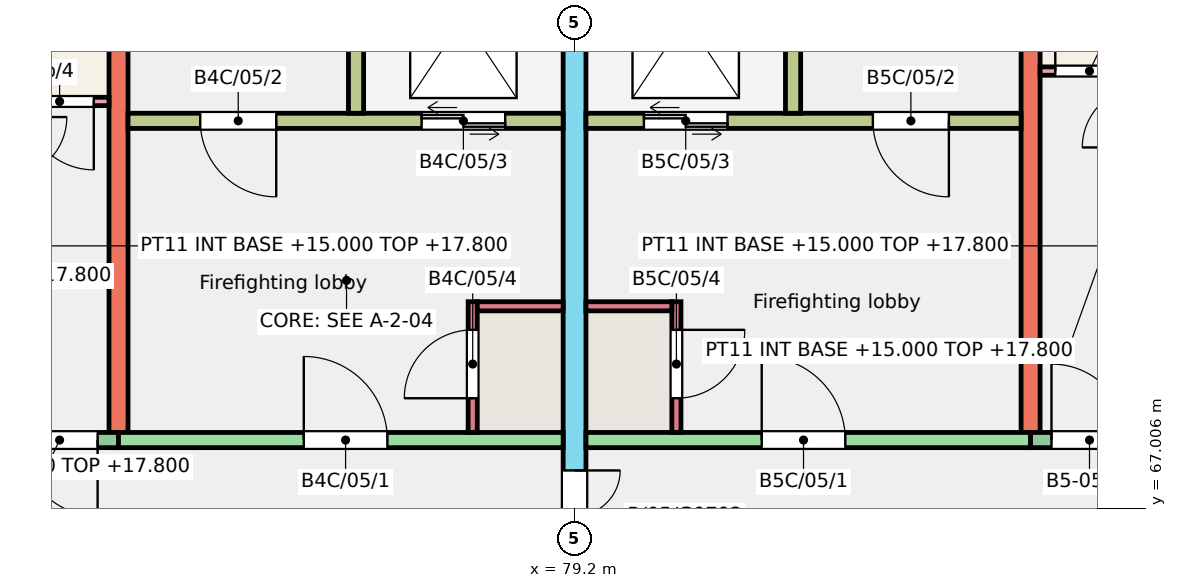
"""IFC4 building model, lengths in metres.
Left out: names, types, materials, properties, quantities, classifications, styles, units other than length and angle.
Written with IfcOpenShell. Run it as: python <this file> out.ifc"""

import sys

from ifc_helpers import new_model, si_unit, direction, frame, frame_2d, origin, place, context, subcontext, project, spatial, rectangle, extrude, element, fill, save


model = new_model("IFC4")
c1 = context("Model", 3, precision=1e-05, world=origin(), true_north=direction((0.0, 1.0)))
c2 = subcontext(c1, "Body", "Model", "MODEL_VIEW")
j1 = project(units=[si_unit("LENGTHUNIT", "METRE"), si_unit("PLANEANGLEUNIT", "RADIAN")], contexts=[c1])
p1 = place(None, origin())
s1 = spatial("IfcSite", under=j1, at=p1, CompositionType="ELEMENT")
p2 = place(p1, origin())
s2 = spatial("IfcBuilding", under=s1, at=p2, CompositionType="ELEMENT")
p3 = place(p2, frame((0.0, 0.0, 15.0)))
s3 = spatial("IfcBuildingStorey", under=s2, at=p3, CompositionType="ELEMENT", Elevation=15.0)
p4 = place(p3, frame((73.2, 68.0, 0.0), z_axis=(0.0, 0.0, 1.0), x_axis=(0.0, 1.0, 0.0)))
e1 = element("IfcWall", 1, at=p4, inside=s3, PredefinedType="SHEAR", context=c2, shape_type="SweptSolid", body=[
    extrude(rectangle(XDim=9.0, YDim=0.25, at=frame_2d((4.5, 0.0))), origin(), (0.0, 0.0, 1.0), 3.0),
])
p5 = place(p3, frame((79.2, 66.0, 0.0), z_axis=(0.0, 0.0, 1.0), x_axis=(0.0, 1.0, 0.0)))
e2 = element("IfcWall", 2, at=p5, inside=s3, PredefinedType="SHEAR", context=c2, shape_type="SweptSolid", body=[
    extrude(rectangle(XDim=11.0, YDim=0.3, at=frame_2d((5.5, 0.0))), origin(), (0.0, 0.0, 1.0), 3.0),
])
p6 = place(p5, frame((0.3, 0.0, 0.0)))
e3 = element("IfcOpeningElement", 3, at=p6, cuts=e2, PredefinedType="OPENING", context=c2, shape_type="SweptSolid", body=[
    extrude(rectangle(XDim=1.2, YDim=2.1, at=frame_2d((0.6, 1.05))), frame((0.0, 0.16, 0.0), z_axis=(0.0, -1.0, 0.0), x_axis=(1.0, 0.0, 0.0)), (0.0, 0.0, 1.0), 0.32),
])
p7 = place(p3, frame((85.2, 68.0, 0.0), z_axis=(0.0, 0.0, 1.0), x_axis=(0.0, 1.0, 0.0)))
e4 = element("IfcWall", 4, at=p7, inside=s3, PredefinedType="SHEAR", context=c2, shape_type="SweptSolid", body=[
    extrude(rectangle(XDim=9.0, YDim=0.25, at=frame_2d((4.5, 0.0))), origin(), (0.0, 0.0, 1.0), 3.0),
])
p8 = place(p3, frame((69.6, 67.9, 0.0), z_axis=(0.0, 0.0, 1.0), x_axis=(1.0, 0.0, 0.0)))
e5 = element("IfcWall", 5, at=p8, inside=s3, PredefinedType="SOLIDWALL", context=c2, shape_type="SweptSolid", body=[
    extrude(rectangle(XDim=3.6, YDim=0.2, at=frame_2d((1.8, 0.0))), origin(), (0.0, 0.0, 1.0), 3.0),
])
p9 = place(p8, frame((0.482, 0.0, 1.1)))
e6 = element("IfcOpeningElement", 6, at=p9, cuts=e5, PredefinedType="OPENING", context=c2, shape_type="SweptSolid", body=[
    extrude(rectangle(XDim=1.2, YDim=1.3, at=frame_2d((0.6, 0.65))), frame((0.0, 0.11, 0.0), z_axis=(0.0, -1.0, 0.0), x_axis=(1.0, 0.0, 0.0)), (0.0, 0.0, 1.0), 0.22),
])
p10 = place(p8, frame((2.325, 0.0, 0.0)))
e7 = element("IfcOpeningElement", 7, at=p10, cuts=e5, PredefinedType="OPENING", context=c2, shape_type="SweptSolid", body=[
    extrude(rectangle(XDim=1.0, YDim=2.1, at=frame_2d((0.5, 1.05))), frame((0.0, 0.11, 0.0), z_axis=(0.0, -1.0, 0.0), x_axis=(1.0, 0.0, 0.0)), (0.0, 0.0, 1.0), 0.22),
])
p11 = place(p3, frame((73.2, 67.9, 0.0), z_axis=(0.0, 0.0, 1.0), x_axis=(1.0, 0.0, 0.0)))
e8 = element("IfcWall", 8, at=p11, inside=s3, PredefinedType="SHEAR", context=c2, shape_type="SweptSolid", body=[
    extrude(rectangle(XDim=5.85, YDim=0.2, at=frame_2d((2.925, 0.0))), origin(), (0.0, 0.0, 1.0), 3.0),
])
p12 = place(p11, frame((2.438, 0.0, 0.0)))
e9 = element("IfcOpeningElement", 9, at=p12, cuts=e8, PredefinedType="OPENING", context=c2, shape_type="SweptSolid", body=[
    extrude(rectangle(XDim=1.1, YDim=2.1, at=frame_2d((0.55, 1.05))), frame((0.0, 0.11, 0.0), z_axis=(0.0, -1.0, 0.0), x_axis=(1.0, 0.0, 0.0)), (0.0, 0.0, 1.0), 0.22),
])
p13 = place(p3, frame((73.325, 72.1, 0.0), z_axis=(0.0, 0.0, 1.0), x_axis=(1.0, 0.0, 0.0)))
e10 = element("IfcWall", 10, at=p13, inside=s3, PredefinedType="SHEAR", context=c2, shape_type="SweptSolid", body=[
    extrude(rectangle(XDim=5.725, YDim=0.2, at=frame_2d((2.863, 0.0))), origin(), (0.0, 0.0, 1.0), 3.0),
])
p14 = place(p13, frame((0.95, 0.0, 0.0)))
e11 = element("IfcOpeningElement", 11, at=p14, cuts=e10, PredefinedType="OPENING", context=c2, shape_type="SweptSolid", body=[
    extrude(rectangle(XDim=1.0, YDim=2.1, at=frame_2d((0.5, 1.05))), frame((0.0, 0.11, 0.0), z_axis=(0.0, -1.0, 0.0), x_axis=(1.0, 0.0, 0.0)), (0.0, 0.0, 1.0), 0.22),
])
p15 = place(p13, frame((3.863, 0.0, 0.0)))
e12 = element("IfcOpeningElement", 12, at=p15, cuts=e10, PredefinedType="OPENING", context=c2, shape_type="SweptSolid", body=[
    extrude(rectangle(XDim=1.1, YDim=2.1, at=frame_2d((0.55, 1.05))), frame((0.0, 0.11, 0.0), z_axis=(0.0, -1.0, 0.0), x_axis=(1.0, 0.0, 0.0)), (0.0, 0.0, 1.0), 0.22),
])
p16 = place(p3, frame((76.325, 72.2, 0.0), z_axis=(0.0, 0.0, 1.0), x_axis=(0.0, 1.0, 0.0)))
e13 = element("IfcWall", 13, at=p16, inside=s3, PredefinedType="SHEAR", context=c2, shape_type="SweptSolid", body=[
    extrude(rectangle(XDim=4.8, YDim=0.2, at=frame_2d((2.4, 0.0))), origin(), (0.0, 0.0, 1.0), 3.0),
])
p17 = place(p3, frame((77.86, 68.0, 0.0), z_axis=(0.0, 0.0, 1.0), x_axis=(0.0, 1.0, 0.0)))
e14 = element("IfcWall", 14, at=p17, inside=s3, PredefinedType="SHEAR", context=c2, shape_type="SweptSolid", body=[
    extrude(rectangle(XDim=1.72, YDim=0.12, at=frame_2d((0.86, 0.0))), origin(), (0.0, 0.0, 1.0), 3.0),
])
p18 = place(p17, frame((0.45, 0.0, 0.0)))
e15 = element("IfcOpeningElement", 15, at=p18, cuts=e14, PredefinedType="OPENING", context=c2, shape_type="SweptSolid", body=[
    extrude(rectangle(XDim=0.9, YDim=2.1, at=frame_2d((0.45, 1.05))), frame((0.0, 0.07, 0.0), z_axis=(0.0, -1.0, 0.0), x_axis=(1.0, 0.0, 0.0)), (0.0, 0.0, 1.0), 0.14),
])
p19 = place(p3, frame((77.92, 69.66, 0.0), z_axis=(0.0, 0.0, 1.0), x_axis=(1.0, 0.0, 0.0)))
e16 = element("IfcWall", 16, at=p19, inside=s3, PredefinedType="SHEAR", context=c2, shape_type="SweptSolid", body=[
    extrude(rectangle(XDim=1.13, YDim=0.12, at=frame_2d((0.565, 0.0))), origin(), (0.0, 0.0, 1.0), 3.0),
])
p20 = place(p3, frame((79.35, 67.9, 0.0), z_axis=(0.0, 0.0, 1.0), x_axis=(1.0, 0.0, 0.0)))
e17 = element("IfcWall", 17, at=p20, inside=s3, PredefinedType="SHEAR", context=c2, shape_type="SweptSolid", body=[
    extrude(rectangle(XDim=5.85, YDim=0.2, at=frame_2d((2.925, 0.0))), origin(), (0.0, 0.0, 1.0), 3.0),
])
p21 = place(p20, frame((2.312, 0.0, 0.0)))
e18 = element("IfcOpeningElement", 18, at=p21, cuts=e17, PredefinedType="OPENING", context=c2, shape_type="SweptSolid", body=[
    extrude(rectangle(XDim=1.1, YDim=2.1, at=frame_2d((0.55, 1.05))), frame((0.0, 0.11, 0.0), z_axis=(0.0, -1.0, 0.0), x_axis=(1.0, 0.0, 0.0)), (0.0, 0.0, 1.0), 0.22),
])
p22 = place(p3, frame((79.35, 72.1, 0.0), z_axis=(0.0, 0.0, 1.0), x_axis=(1.0, 0.0, 0.0)))
e19 = element("IfcWall", 19, at=p22, inside=s3, PredefinedType="SHEAR", context=c2, shape_type="SweptSolid", body=[
    extrude(rectangle(XDim=5.725, YDim=0.2, at=frame_2d((2.862, 0.0))), origin(), (0.0, 0.0, 1.0), 3.0),
])
p23 = place(p22, frame((3.775, 0.0, 0.0)))
e20 = element("IfcOpeningElement", 20, at=p23, cuts=e19, PredefinedType="OPENING", context=c2, shape_type="SweptSolid", body=[
    extrude(rectangle(XDim=1.0, YDim=2.1, at=frame_2d((0.5, 1.05))), frame((0.0, 0.11, 0.0), z_axis=(0.0, -1.0, 0.0), x_axis=(1.0, 0.0, 0.0)), (0.0, 0.0, 1.0), 0.22),
])
p24 = place(p22, frame((0.762, 0.0, 0.0)))
e21 = element("IfcOpeningElement", 21, at=p24, cuts=e19, PredefinedType="OPENING", context=c2, shape_type="SweptSolid", body=[
    extrude(rectangle(XDim=1.1, YDim=2.1, at=frame_2d((0.55, 1.05))), frame((0.0, 0.11, 0.0), z_axis=(0.0, -1.0, 0.0), x_axis=(1.0, 0.0, 0.0)), (0.0, 0.0, 1.0), 0.22),
])
p25 = place(p3, frame((82.075, 72.2, 0.0), z_axis=(0.0, 0.0, 1.0), x_axis=(0.0, 1.0, 0.0)))
e22 = element("IfcWall", 22, at=p25, inside=s3, PredefinedType="SHEAR", context=c2, shape_type="SweptSolid", body=[
    extrude(rectangle(XDim=4.8, YDim=0.2, at=frame_2d((2.4, 0.0))), origin(), (0.0, 0.0, 1.0), 3.0),
])
p26 = place(p3, frame((80.54, 68.0, 0.0), z_axis=(0.0, 0.0, 1.0), x_axis=(0.0, 1.0, 0.0)))
e23 = element("IfcWall", 23, at=p26, inside=s3, PredefinedType="SHEAR", context=c2, shape_type="SweptSolid", body=[
    extrude(rectangle(XDim=1.72, YDim=0.12, at=frame_2d((0.86, 0.0))), origin(), (0.0, 0.0, 1.0), 3.0),
])
p27 = place(p26, frame((0.45, 0.0, 0.0)))
e24 = element("IfcOpeningElement", 24, at=p27, cuts=e23, PredefinedType="OPENING", context=c2, shape_type="SweptSolid", body=[
    extrude(rectangle(XDim=0.9, YDim=2.1, at=frame_2d((0.45, 1.05))), frame((0.0, 0.07, 0.0), z_axis=(0.0, -1.0, 0.0), x_axis=(1.0, 0.0, 0.0)), (0.0, 0.0, 1.0), 0.14),
])
p28 = place(p3, frame((79.35, 69.66, 0.0), z_axis=(0.0, 0.0, 1.0), x_axis=(1.0, 0.0, 0.0)))
e25 = element("IfcWall", 25, at=p28, inside=s3, PredefinedType="SHEAR", context=c2, shape_type="SweptSolid", body=[
    extrude(rectangle(XDim=1.13, YDim=0.12, at=frame_2d((0.565, 0.0))), origin(), (0.0, 0.0, 1.0), 3.0),
])
p29 = place(p3, frame((85.2, 67.9, 0.0), z_axis=(0.0, 0.0, 1.0), x_axis=(1.0, 0.0, 0.0)))
e26 = element("IfcWall", 26, at=p29, inside=s3, PredefinedType="SOLIDWALL", context=c2, shape_type="SweptSolid", body=[
    extrude(rectangle(XDim=3.6, YDim=0.2, at=frame_2d((1.8, 0.0))), origin(), (0.0, 0.0, 1.0), 3.0),
])
p30 = place(p29, frame((1.917, 0.0, 1.1)))
e27 = element("IfcOpeningElement", 27, at=p30, cuts=e26, PredefinedType="OPENING", context=c2, shape_type="SweptSolid", body=[
    extrude(rectangle(XDim=1.2, YDim=1.3, at=frame_2d((0.6, 0.65))), frame((0.0, 0.11, 0.0), z_axis=(0.0, -1.0, 0.0), x_axis=(1.0, 0.0, 0.0)), (0.0, 0.0, 1.0), 0.22),
])
p31 = place(p29, frame((0.275, 0.0, 0.0)))
e28 = element("IfcOpeningElement", 28, at=p31, cuts=e26, PredefinedType="OPENING", context=c2, shape_type="SweptSolid", body=[
    extrude(rectangle(XDim=1.0, YDim=2.1, at=frame_2d((0.5, 1.05))), frame((0.0, 0.11, 0.0), z_axis=(0.0, -1.0, 0.0), x_axis=(1.0, 0.0, 0.0)), (0.0, 0.0, 1.0), 0.22),
])
p32 = place(p3, frame((69.7, 72.355, 0.0), z_axis=(0.0, 0.0, 1.0), x_axis=(1.0, 0.0, 0.0)))
e29 = element("IfcWall", 29, at=p32, inside=s3, PredefinedType="PARTITIONING", context=c2, shape_type="SweptSolid", body=[
    extrude(rectangle(XDim=3.375, YDim=0.11, at=frame_2d((1.688, 0.0))), origin(), (0.0, 0.0, 1.0), 2.8),
])
p33 = place(p32, frame((2.275, 0.0, 0.0)))
e30 = element("IfcOpeningElement", 30, at=p33, cuts=e29, PredefinedType="OPENING", context=c2, shape_type="SweptSolid", body=[
    extrude(rectangle(XDim=0.9, YDim=2.1, at=frame_2d((0.45, 1.05))), frame((0.0, 0.065, 0.0), z_axis=(0.0, -1.0, 0.0), x_axis=(1.0, 0.0, 0.0)), (0.0, 0.0, 1.0), 0.13),
])
p34 = place(p3, frame((85.325, 72.755, 0.0), z_axis=(0.0, 0.0, 1.0), x_axis=(1.0, 0.0, 0.0)))
e31 = element("IfcWall", 31, at=p34, inside=s3, PredefinedType="PARTITIONING", context=c2, shape_type="SweptSolid", body=[
    extrude(rectangle(XDim=3.375, YDim=0.11, at=frame_2d((1.688, 0.0))), origin(), (0.0, 0.0, 1.0), 2.8),
])
p35 = place(p34, frame((0.2, 0.0, 0.0)))
e32 = element("IfcOpeningElement", 32, at=p35, cuts=e31, PredefinedType="OPENING", context=c2, shape_type="SweptSolid", body=[
    extrude(rectangle(XDim=0.9, YDim=2.1, at=frame_2d((0.45, 1.05))), frame((0.0, 0.065, 0.0), z_axis=(0.0, -1.0, 0.0), x_axis=(1.0, 0.0, 0.0)), (0.0, 0.0, 1.0), 0.13),
])
p36 = place(p10, origin())
e33 = element("IfcDoor", 33, at=p36, inside=s3, OperationType="SINGLE_SWING_RIGHT", PredefinedType="DOOR", context=c2, shape_type="SweptSolid", body=[
    extrude(rectangle(XDim=1.0, YDim=2.1, at=frame_2d((0.5, 1.05))), frame((0.0, 0.025, 0.0), z_axis=(0.0, -1.0, 0.0), x_axis=(1.0, 0.0, 0.0)), (0.0, 0.0, 1.0), 0.05),
])
fill(e7, e33)
p37 = place(p33, origin())
e34 = element("IfcDoor", 34, at=p37, inside=s3, OperationType="SINGLE_SWING_RIGHT", PredefinedType="DOOR", context=c2, shape_type="SweptSolid", body=[
    extrude(rectangle(XDim=0.9, YDim=2.1, at=frame_2d((0.45, 1.05))), frame((0.0, 0.025, 0.0), z_axis=(0.0, -1.0, 0.0), x_axis=(1.0, 0.0, 0.0)), (0.0, 0.0, 1.0), 0.05),
])
fill(e30, e34)
p38 = place(p31, origin())
e35 = element("IfcDoor", 35, at=p38, inside=s3, OperationType="SINGLE_SWING_LEFT", PredefinedType="DOOR", context=c2, shape_type="SweptSolid", body=[
    extrude(rectangle(XDim=1.0, YDim=2.1, at=frame_2d((0.5, 1.05))), frame((0.0, 0.025, 0.0), z_axis=(0.0, -1.0, 0.0), x_axis=(1.0, 0.0, 0.0)), (0.0, 0.0, 1.0), 0.05),
])
fill(e28, e35)
p39 = place(p35, origin())
e36 = element("IfcDoor", 36, at=p39, inside=s3, OperationType="SINGLE_SWING_LEFT", PredefinedType="DOOR", context=c2, shape_type="SweptSolid", body=[
    extrude(rectangle(XDim=0.9, YDim=2.1, at=frame_2d((0.45, 1.05))), frame((0.0, 0.025, 0.0), z_axis=(0.0, -1.0, 0.0), x_axis=(1.0, 0.0, 0.0)), (0.0, 0.0, 1.0), 0.05),
])
fill(e32, e36)
p40 = place(p12, origin())
e37 = element("IfcDoor", 37, at=p40, inside=s3, OperationType="SINGLE_SWING_LEFT", PredefinedType="DOOR", context=c2, shape_type="SweptSolid", body=[
    extrude(rectangle(XDim=1.1, YDim=2.1, at=frame_2d((0.55, 1.05))), frame((0.0, 0.025, 0.0), z_axis=(0.0, -1.0, 0.0), x_axis=(1.0, 0.0, 0.0)), (0.0, 0.0, 1.0), 0.05),
])
fill(e9, e37)
p41 = place(p14, origin())
e38 = element("IfcDoor", 38, at=p41, inside=s3, OperationType="SINGLE_SWING_RIGHT", PredefinedType="DOOR", context=c2, shape_type="SweptSolid", body=[
    extrude(rectangle(XDim=1.0, YDim=2.1, at=frame_2d((0.5, 1.05))), frame((0.0, 0.025, 0.0), z_axis=(0.0, -1.0, 0.0), x_axis=(1.0, 0.0, 0.0)), (0.0, 0.0, 1.0), 0.05),
])
fill(e11, e38)
p42 = place(p15, origin())
e39 = element("IfcDoor", 39, at=p42, inside=s3, OperationType="DOUBLE_DOOR_SLIDING", PredefinedType="DOOR", context=c2, shape_type="SweptSolid", body=[
    extrude(rectangle(XDim=1.1, YDim=2.1, at=frame_2d((0.55, 1.05))), frame((0.0, 0.025, 0.0), z_axis=(0.0, -1.0, 0.0), x_axis=(1.0, 0.0, 0.0)), (0.0, 0.0, 1.0), 0.05),
])
fill(e12, e39)
p43 = place(p18, origin())
e40 = element("IfcDoor", 40, at=p43, inside=s3, OperationType="SINGLE_SWING_LEFT", PredefinedType="DOOR", context=c2, shape_type="SweptSolid", body=[
    extrude(rectangle(XDim=0.9, YDim=2.1, at=frame_2d((0.45, 1.05))), frame((0.0, 0.025, 0.0), z_axis=(0.0, -1.0, 0.0), x_axis=(1.0, 0.0, 0.0)), (0.0, 0.0, 1.0), 0.05),
])
fill(e15, e40)
p44 = place(p21, origin())
e41 = element("IfcDoor", 41, at=p44, inside=s3, OperationType="SINGLE_SWING_LEFT", PredefinedType="DOOR", context=c2, shape_type="SweptSolid", body=[
    extrude(rectangle(XDim=1.1, YDim=2.1, at=frame_2d((0.55, 1.05))), frame((0.0, 0.025, 0.0), z_axis=(0.0, -1.0, 0.0), x_axis=(1.0, 0.0, 0.0)), (0.0, 0.0, 1.0), 0.05),
])
fill(e18, e41)
p45 = place(p23, origin())
e42 = element("IfcDoor", 42, at=p45, inside=s3, OperationType="SINGLE_SWING_RIGHT", PredefinedType="DOOR", context=c2, shape_type="SweptSolid", body=[
    extrude(rectangle(XDim=1.0, YDim=2.1, at=frame_2d((0.5, 1.05))), frame((0.0, 0.025, 0.0), z_axis=(0.0, -1.0, 0.0), x_axis=(1.0, 0.0, 0.0)), (0.0, 0.0, 1.0), 0.05),
])
fill(e20, e42)
p46 = place(p24, origin())
e43 = element("IfcDoor", 43, at=p46, inside=s3, OperationType="DOUBLE_DOOR_SLIDING", PredefinedType="DOOR", context=c2, shape_type="SweptSolid", body=[
    extrude(rectangle(XDim=1.1, YDim=2.1, at=frame_2d((0.55, 1.05))), frame((0.0, 0.025, 0.0), z_axis=(0.0, -1.0, 0.0), x_axis=(1.0, 0.0, 0.0)), (0.0, 0.0, 1.0), 0.05),
])
fill(e21, e43)
p47 = place(p27, origin())
e44 = element("IfcDoor", 44, at=p47, inside=s3, OperationType="SINGLE_SWING_RIGHT", PredefinedType="DOOR", context=c2, shape_type="SweptSolid", body=[
    extrude(rectangle(XDim=0.9, YDim=2.1, at=frame_2d((0.45, 1.05))), frame((0.0, 0.025, 0.0), z_axis=(0.0, -1.0, 0.0), x_axis=(1.0, 0.0, 0.0)), (0.0, 0.0, 1.0), 0.05),
])
fill(e24, e44)
p48 = place(p6, origin())
e45 = element("IfcDoor", 45, at=p48, inside=s3, OperationType="DOUBLE_DOOR_SINGLE_SWING", PredefinedType="DOOR", context=c2, shape_type="SweptSolid", body=[
    extrude(rectangle(XDim=1.2, YDim=2.1, at=frame_2d((0.6, 1.05))), frame((0.0, 0.025, 0.0), z_axis=(0.0, -1.0, 0.0), x_axis=(1.0, 0.0, 0.0)), (0.0, 0.0, 1.0), 0.05),
])
fill(e3, e45)
save(model, sys.argv[1])
